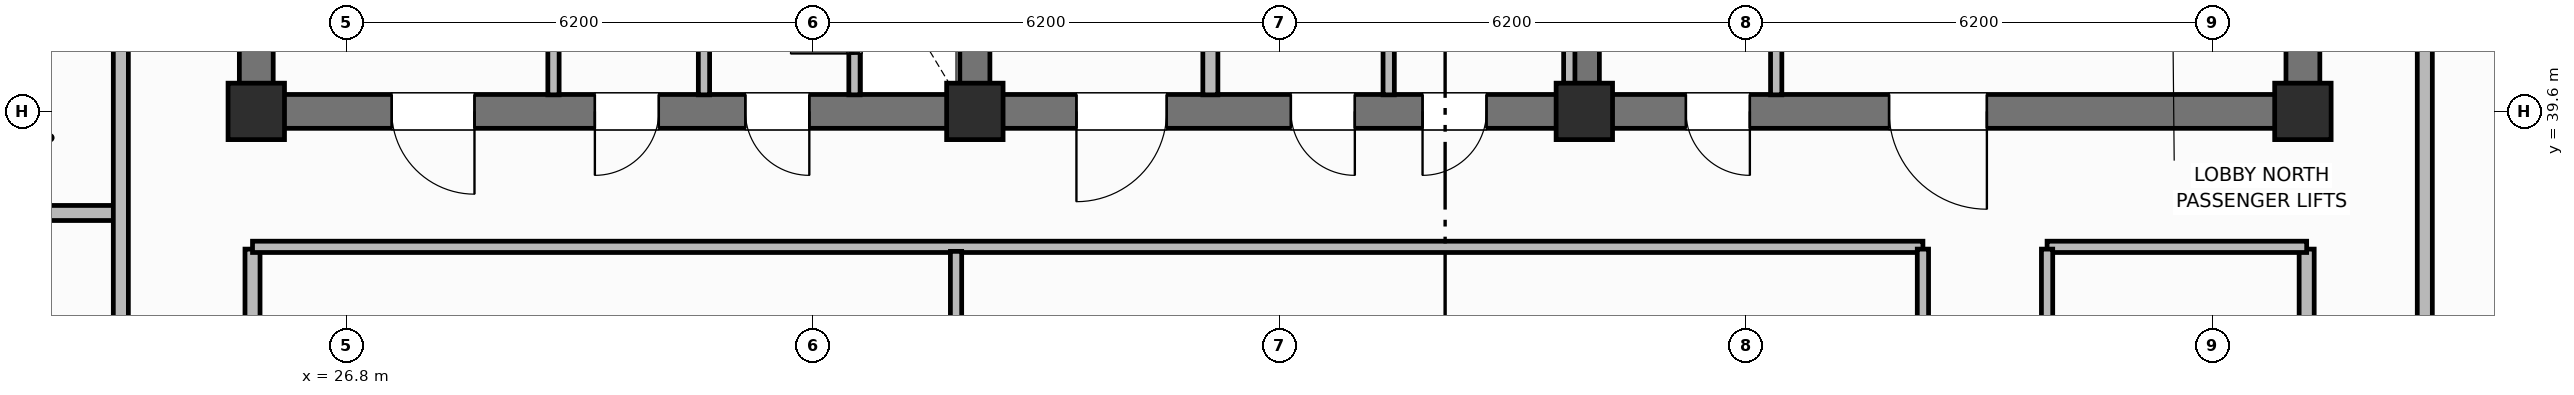
"""IFC4 building model, lengths in metres.
Left out: names, types, materials, properties, quantities, classifications, styles, units other than length and angle.
Written with IfcOpenShell. Run it as: python <this file> out.ifc"""

import sys

from ifc_helpers import new_model, si_unit, direction, frame, frame_2d, origin, origin_2d, place, context, subcontext, project, spatial, rectangle, extrude, element, fill, save


model = new_model("IFC4")
c1 = context("Model", 3, precision=1e-05, world=origin(), true_north=direction((0.0, 1.0)))
c2 = subcontext(c1, "Body", "Model", "MODEL_VIEW")
j1 = project(units=[si_unit("LENGTHUNIT", "METRE"), si_unit("PLANEANGLEUNIT", "RADIAN")], contexts=[c1])
p1 = place(None, origin())
s1 = spatial("IfcSite", under=j1, at=p1, CompositionType="ELEMENT")
p2 = place(p1, origin())
s2 = spatial("IfcBuilding", under=s1, at=p2, CompositionType="ELEMENT")
p3 = place(p2, frame((0.0, 0.0, 267.6)))
s3 = spatial("IfcBuildingStorey", under=s2, at=p3, CompositionType="ELEMENT", Elevation=267.6)
for number, where, z_axis, x_axis in (
    (1, (25.6, 39.825, 0.0), (0.0, 0.0, 1.0), (0.0, 1.0, 0.0)),
    (2, (52.8, 39.825, 0.0), (0.0, 0.0, 1.0), (0.0, 1.0, 0.0)),
):
    element("IfcWall", number, at=place(p3, frame(where, z_axis=z_axis, x_axis=x_axis)), inside=s3, PredefinedType="SHEAR", context=c2, shape_type="SweptSolid", body=[
        extrude(rectangle(XDim=5.75, YDim=0.45, at=frame_2d((2.875, 0.0))), origin(), (0.0, 0.0, 1.0), 3.7),
    ])
p4 = place(p3, frame((52.8, 39.6, 0.0), z_axis=(0.0, 0.0, 1.0), x_axis=(-1.0, 0.0, 0.0)))
e3 = element("IfcWall", 3, at=p4, inside=s3, PredefinedType="SHEAR", context=c2, shape_type="SweptSolid", body=[
    extrude(rectangle(XDim=27.2, YDim=0.45, at=frame_2d((13.6, 0.0))), origin(), (0.0, 0.0, 1.0), 3.7),
])
p5 = place(p4, frame((24.3, 0.0, 0.0)))
e4 = element("IfcOpeningElement", 4, at=p5, cuts=e3, PredefinedType="OPENING", context=c2, shape_type="SweptSolid", body=[
    extrude(rectangle(XDim=1.1, YDim=2.15, at=frame_2d((0.55, 1.075))), frame((0.0, 0.235, 0.0), z_axis=(0.0, -1.0, 0.0), x_axis=(1.0, 0.0, 0.0)), (0.0, 0.0, 1.0), 0.47),
])
p6 = place(p4, frame((21.85, 0.0, 0.0)))
e5 = element("IfcOpeningElement", 5, at=p6, cuts=e3, PredefinedType="OPENING", context=c2, shape_type="SweptSolid", body=[
    extrude(rectangle(XDim=0.85, YDim=2.1, at=frame_2d((0.425, 1.05))), frame((0.0, 0.235, 0.0), z_axis=(0.0, -1.0, 0.0), x_axis=(1.0, 0.0, 0.0)), (0.0, 0.0, 1.0), 0.47),
])
p7 = place(p4, frame((19.85, 0.0, 0.0)))
e6 = element("IfcOpeningElement", 6, at=p7, cuts=e3, PredefinedType="OPENING", context=c2, shape_type="SweptSolid", body=[
    extrude(rectangle(XDim=0.85, YDim=2.1, at=frame_2d((0.425, 1.05))), frame((0.0, 0.235, 0.0), z_axis=(0.0, -1.0, 0.0), x_axis=(1.0, 0.0, 0.0)), (0.0, 0.0, 1.0), 0.47),
])
p8 = place(p4, frame((15.1, 0.0, 0.0)))
e7 = element("IfcOpeningElement", 7, at=p8, cuts=e3, PredefinedType="OPENING", context=c2, shape_type="SweptSolid", body=[
    extrude(rectangle(XDim=1.2, YDim=2.15, at=frame_2d((0.6, 1.075))), frame((0.0, 0.235, 0.0), z_axis=(0.0, -1.0, 0.0), x_axis=(1.0, 0.0, 0.0)), (0.0, 0.0, 1.0), 0.47),
])
p9 = place(p4, frame((12.6, 0.0, 0.0)))
e8 = element("IfcOpeningElement", 8, at=p9, cuts=e3, PredefinedType="OPENING", context=c2, shape_type="SweptSolid", body=[
    extrude(rectangle(XDim=0.85, YDim=2.1, at=frame_2d((0.425, 1.05))), frame((0.0, 0.235, 0.0), z_axis=(0.0, -1.0, 0.0), x_axis=(1.0, 0.0, 0.0)), (0.0, 0.0, 1.0), 0.47),
])
p10 = place(p4, frame((10.85, 0.0, 0.0)))
e9 = element("IfcOpeningElement", 9, at=p10, cuts=e3, PredefinedType="OPENING", context=c2, shape_type="SweptSolid", body=[
    extrude(rectangle(XDim=0.85, YDim=2.1, at=frame_2d((0.425, 1.05))), frame((0.0, 0.235, 0.0), z_axis=(0.0, -1.0, 0.0), x_axis=(1.0, 0.0, 0.0)), (0.0, 0.0, 1.0), 0.47),
])
p11 = place(p4, frame((7.35, 0.0, 0.0)))
e10 = element("IfcOpeningElement", 10, at=p11, cuts=e3, PredefinedType="OPENING", context=c2, shape_type="SweptSolid", body=[
    extrude(rectangle(XDim=0.85, YDim=2.1, at=frame_2d((0.425, 1.05))), frame((0.0, 0.235, 0.0), z_axis=(0.0, -1.0, 0.0), x_axis=(1.0, 0.0, 0.0)), (0.0, 0.0, 1.0), 0.47),
])
p12 = place(p4, frame((4.2, 0.0, 0.0)))
e11 = element("IfcOpeningElement", 11, at=p12, cuts=e3, PredefinedType="OPENING", context=c2, shape_type="SweptSolid", body=[
    extrude(rectangle(XDim=1.3, YDim=2.2, at=frame_2d((0.65, 1.1))), frame((0.0, 0.235, 0.0), z_axis=(0.0, -1.0, 0.0), x_axis=(1.0, 0.0, 0.0)), (0.0, 0.0, 1.0), 0.47),
])
for number, where, z_axis, x_axis in (
    (12, (35.15, 39.825, 0.0), (0.0, 0.0, 1.0), (0.0, 1.0, 0.0)),
    (13, (43.25, 39.825, 0.0), (0.0, 0.0, 1.0), (0.0, 1.0, 0.0)),
):
    element("IfcWall", number, at=place(p3, frame(where, z_axis=z_axis, x_axis=x_axis)), inside=s3, PredefinedType="SHEAR", context=c2, shape_type="SweptSolid", body=[
        extrude(rectangle(XDim=5.75, YDim=0.4, at=frame_2d((2.875, 0.0))), origin(), (0.0, 0.0, 1.0), 3.7),
    ])
for number, where, z_axis, x_axis in (
    (14, (25.6, 39.6, 0.0), (0.0, 0.0, 1.0), (1.0, 0.0, 0.0)),
    (15, (35.15, 39.6, 0.0), (0.0, 0.0, 1.0), (1.0, 0.0, 0.0)),
    (16, (43.25, 39.6, 0.0), (0.0, 0.0, 1.0), (1.0, 0.0, 0.0)),
    (17, (52.8, 39.6, 0.0), (0.0, 0.0, 1.0), (1.0, 0.0, 0.0)),
):
    element("IfcColumn", number, at=place(p3, frame(where, z_axis=z_axis, x_axis=x_axis)), inside=s3, PredefinedType="COLUMN", context=c2, shape_type="SweptSolid", body=[
        extrude(rectangle(XDim=0.75, YDim=0.75, at=origin_2d()), origin(), (0.0, 0.0, 1.0), 3.7),
    ])
p13 = place(p3, frame((33.55, 39.82, 0.0), z_axis=(0.0, 0.0, 1.0), x_axis=(0.0, 1.0, 0.0)))
e18 = element("IfcWall", 18, at=p13, inside=s3, PredefinedType="PARTITIONING", context=c2, shape_type="SweptSolid", body=[
    extrude(rectangle(XDim=2.13, YDim=0.15, at=frame_2d((1.065, 0.0))), origin(), (0.0, 0.0, 1.0), 2.56),
])
p14 = place(p13, frame((0.55, 0.0, 0.0)))
e19 = element("IfcOpeningElement", 19, at=p14, cuts=e18, PredefinedType="OPENING", context=c2, shape_type="SweptSolid", body=[
    extrude(rectangle(XDim=0.85, YDim=2.05, at=frame_2d((0.425, 1.025))), frame((0.0, 0.085, 0.0), z_axis=(0.0, -1.0, 0.0), x_axis=(1.0, 0.0, 0.0)), (0.0, 0.0, 1.0), 0.17),
])
for number, where, z_axis, x_axis in (
    (20, (29.55, 39.82, 0.0), (0.0, 0.0, 1.0), (0.0, 1.0, 0.0)),
    (21, (31.55, 39.82, 0.0), (0.0, 0.0, 1.0), (0.0, 1.0, 0.0)),
):
    element("IfcWall", number, at=place(p3, frame(where, z_axis=z_axis, x_axis=x_axis)), inside=s3, PredefinedType="PARTITIONING", context=c2, shape_type="SweptSolid", body=[
        extrude(rectangle(XDim=2.13, YDim=0.15, at=frame_2d((1.065, 0.0))), origin(), (0.0, 0.0, 1.0), 2.56),
    ])
p15 = place(p3, frame((38.28, 39.82, 0.0), z_axis=(0.0, 0.0, 1.0), x_axis=(0.0, 1.0, 0.0)))
e22 = element("IfcWall", 22, at=p15, inside=s3, PredefinedType="PARTITIONING", context=c2, shape_type="SweptSolid", body=[
    extrude(rectangle(XDim=5.63, YDim=0.2, at=frame_2d((2.815, 0.0))), origin(), (0.0, 0.0, 1.0), 2.56),
])
for number, where, z_axis, x_axis in (
    (23, (43.05, 39.82, 0.0), (0.0, 0.0, 1.0), (0.0, 1.0, 0.0)),
    (24, (40.65, 39.82, 0.0), (0.0, 0.0, 1.0), (0.0, 1.0, 0.0)),
    (25, (45.8, 39.82, 0.0), (0.0, 0.0, 1.0), (0.0, 1.0, 0.0)),
):
    element("IfcWall", number, at=place(p3, frame(where, z_axis=z_axis, x_axis=x_axis)), inside=s3, PredefinedType="PARTITIONING", context=c2, shape_type="SweptSolid", body=[
        extrude(rectangle(XDim=5.63, YDim=0.15, at=frame_2d((2.815, 0.0))), origin(), (0.0, 0.0, 1.0), 2.56),
    ])
for number, where, z_axis, x_axis in (
    (26, (25.55, 18.63, 0.0), (0.0, 0.0, 1.0), (0.0, 1.0, 0.0)),
    (27, (52.85, 18.63, 0.0), (0.0, 0.0, 1.0), (0.0, 1.0, 0.0)),
):
    element("IfcWall", number, at=place(p3, frame(where, z_axis=z_axis, x_axis=x_axis)), inside=s3, PredefinedType="PARTITIONING", context=c2, shape_type="SweptSolid", body=[
        extrude(rectangle(XDim=19.14, YDim=0.2, at=frame_2d((9.57, 0.0))), origin(), (0.0, 0.0, 1.0), 2.56),
    ])
p16 = place(p3, frame((25.55, 37.8, 0.0), z_axis=(0.0, 0.0, 1.0), x_axis=(1.0, 0.0, 0.0)))
e28 = element("IfcWall", 28, at=p16, inside=s3, PredefinedType="PARTITIONING", context=c2, shape_type="SweptSolid", body=[
    extrude(rectangle(XDim=22.2, YDim=0.15, at=frame_2d((11.1, 0.0))), origin(), (0.0, 0.0, 1.0), 2.56),
])
p17 = place(p3, frame((49.4, 37.8, 0.0), z_axis=(0.0, 0.0, 1.0), x_axis=(1.0, 0.0, 0.0)))
e29 = element("IfcWall", 29, at=p17, inside=s3, PredefinedType="PARTITIONING", context=c2, shape_type="SweptSolid", body=[
    extrude(rectangle(XDim=3.45, YDim=0.15, at=frame_2d((1.725, 0.0))), origin(), (0.0, 0.0, 1.0), 2.56),
])
p18 = place(p3, frame((34.9, 18.66, 0.0), z_axis=(0.0, 0.0, 1.0), x_axis=(0.0, 1.0, 0.0)))
e30 = element("IfcWall", 30, at=p18, inside=s3, PredefinedType="PARTITIONING", context=c2, shape_type="SweptSolid", body=[
    extrude(rectangle(XDim=19.08, YDim=0.15, at=frame_2d((9.54, 0.0))), origin(), (0.0, 0.0, 1.0), 2.56),
])
p19 = place(p18, frame((5.0, 0.0, 0.0)))
e31 = element("IfcOpeningElement", 31, at=p19, cuts=e30, PredefinedType="OPENING", context=c2, shape_type="SweptSolid", body=[
    extrude(rectangle(XDim=1.0, YDim=2.15, at=frame_2d((0.5, 1.075))), frame((0.0, 0.085, 0.0), z_axis=(0.0, -1.0, 0.0), x_axis=(1.0, 0.0, 0.0)), (0.0, 0.0, 1.0), 0.17),
])
p20 = place(p3, frame((47.75, 18.63, 0.0), z_axis=(0.0, 0.0, 1.0), x_axis=(0.0, 1.0, 0.0)))
e32 = element("IfcWall", 32, at=p20, inside=s3, PredefinedType="PARTITIONING", context=c2, shape_type="SweptSolid", body=[
    extrude(rectangle(XDim=19.14, YDim=0.15, at=frame_2d((9.57, 0.0))), origin(), (0.0, 0.0, 1.0), 2.56),
])
p21 = place(p20, frame((2.4, 0.0, 0.0)))
e33 = element("IfcOpeningElement", 33, at=p21, cuts=e32, PredefinedType="OPENING", context=c2, shape_type="SweptSolid", body=[
    extrude(rectangle(XDim=0.9, YDim=2.1, at=frame_2d((0.45, 1.05))), frame((0.0, 0.085, 0.0), z_axis=(0.0, -1.0, 0.0), x_axis=(1.0, 0.0, 0.0)), (0.0, 0.0, 1.0), 0.17),
])
p22 = place(p20, frame((10.804, 0.0, 0.0)))
e34 = element("IfcOpeningElement", 34, at=p22, cuts=e32, PredefinedType="OPENING", context=c2, shape_type="SweptSolid", body=[
    extrude(rectangle(XDim=0.9, YDim=2.1, at=frame_2d((0.45, 1.05))), frame((0.0, 0.085, 0.0), z_axis=(0.0, -1.0, 0.0), x_axis=(1.0, 0.0, 0.0)), (0.0, 0.0, 1.0), 0.17),
])
p23 = place(p3, frame((49.4, 18.63, 0.0), z_axis=(0.0, 0.0, 1.0), x_axis=(0.0, 1.0, 0.0)))
e35 = element("IfcWall", 35, at=p23, inside=s3, PredefinedType="PARTITIONING", context=c2, shape_type="SweptSolid", body=[
    extrude(rectangle(XDim=19.14, YDim=0.15, at=frame_2d((9.57, 0.0))), origin(), (0.0, 0.0, 1.0), 2.56),
])
p24 = place(p23, frame((2.4, 0.0, 0.0)))
e36 = element("IfcOpeningElement", 36, at=p24, cuts=e35, PredefinedType="OPENING", context=c2, shape_type="SweptSolid", body=[
    extrude(rectangle(XDim=1.0, YDim=2.15, at=frame_2d((0.5, 1.075))), frame((0.0, 0.085, 0.0), z_axis=(0.0, -1.0, 0.0), x_axis=(1.0, 0.0, 0.0)), (0.0, 0.0, 1.0), 0.17),
])
p25 = place(p23, frame((10.804, 0.0, 0.0)))
e37 = element("IfcOpeningElement", 37, at=p25, cuts=e35, PredefinedType="OPENING", context=c2, shape_type="SweptSolid", body=[
    extrude(rectangle(XDim=1.0, YDim=2.15, at=frame_2d((0.5, 1.075))), frame((0.0, 0.085, 0.0), z_axis=(0.0, -1.0, 0.0), x_axis=(1.0, 0.0, 0.0)), (0.0, 0.0, 1.0), 0.17),
])
p26 = place(p3, frame((19.53, 38.25, 0.0), z_axis=(0.0, 0.0, 1.0), x_axis=(1.0, 0.0, 0.0)))
e38 = element("IfcWall", 38, at=p26, inside=s3, PredefinedType="PARTITIONING", context=c2, shape_type="SweptSolid", body=[
    extrude(rectangle(XDim=4.27, YDim=0.2, at=frame_2d((2.135, 0.0))), origin(), (0.0, 0.0, 1.0), 2.56),
])
p27 = place(p3, frame((23.8, 9.95, 0.0), z_axis=(0.0, 0.0, 1.0), x_axis=(0.0, 1.0, 0.0)))
e39 = element("IfcWall", 39, at=p27, inside=s3, PredefinedType="PARTITIONING", context=c2, shape_type="SweptSolid", body=[
    extrude(rectangle(XDim=36.5, YDim=0.2, at=frame_2d((18.25, 0.0))), origin(), (0.0, 0.0, 1.0), 2.56),
])
p28 = place(p27, frame((3.11, 0.0, 0.0)))
e40 = element("IfcOpeningElement", 40, at=p28, cuts=e39, PredefinedType="OPENING", context=c2, shape_type="SweptSolid", body=[
    extrude(rectangle(XDim=1.0, YDim=2.15, at=frame_2d((0.5, 1.075))), frame((0.0, 0.11, 0.0), z_axis=(0.0, -1.0, 0.0), x_axis=(1.0, 0.0, 0.0)), (0.0, 0.0, 1.0), 0.22),
])
p29 = place(p27, frame((11.99, 0.0, 0.0)))
e41 = element("IfcOpeningElement", 41, at=p29, cuts=e39, PredefinedType="OPENING", context=c2, shape_type="SweptSolid", body=[
    extrude(rectangle(XDim=1.0, YDim=2.15, at=frame_2d((0.5, 1.075))), frame((0.0, 0.11, 0.0), z_axis=(0.0, -1.0, 0.0), x_axis=(1.0, 0.0, 0.0)), (0.0, 0.0, 1.0), 0.22),
])
p30 = place(p27, frame((23.5, 0.0, 0.0)))
e42 = element("IfcOpeningElement", 42, at=p30, cuts=e39, PredefinedType="OPENING", context=c2, shape_type="SweptSolid", body=[
    extrude(rectangle(XDim=1.0, YDim=2.15, at=frame_2d((0.5, 1.075))), frame((0.0, 0.11, 0.0), z_axis=(0.0, -1.0, 0.0), x_axis=(1.0, 0.0, 0.0)), (0.0, 0.0, 1.0), 0.22),
])
p31 = place(p27, frame((31.2, 0.0, 0.0)))
e43 = element("IfcOpeningElement", 43, at=p31, cuts=e39, PredefinedType="OPENING", context=c2, shape_type="SweptSolid", body=[
    extrude(rectangle(XDim=1.0, YDim=2.15, at=frame_2d((0.5, 1.075))), frame((0.0, 0.11, 0.0), z_axis=(0.0, -1.0, 0.0), x_axis=(1.0, 0.0, 0.0)), (0.0, 0.0, 1.0), 0.22),
])
p32 = place(p3, frame((54.42, 9.95, 0.0), z_axis=(0.0, 0.0, 1.0), x_axis=(0.0, 1.0, 0.0)))
e44 = element("IfcWall", 44, at=p32, inside=s3, PredefinedType="PARTITIONING", context=c2, shape_type="SweptSolid", body=[
    extrude(rectangle(XDim=36.5, YDim=0.2, at=frame_2d((18.25, 0.0))), origin(), (0.0, 0.0, 1.0), 2.56),
])
p33 = place(p32, frame((3.25, 0.0, 0.0)))
e45 = element("IfcOpeningElement", 45, at=p33, cuts=e44, PredefinedType="OPENING", context=c2, shape_type="SweptSolid", body=[
    extrude(rectangle(XDim=1.0, YDim=2.15, at=frame_2d((0.5, 1.075))), frame((0.0, 0.11, 0.0), z_axis=(0.0, -1.0, 0.0), x_axis=(1.0, 0.0, 0.0)), (0.0, 0.0, 1.0), 0.22),
])
p34 = place(p32, frame((14.25, 0.0, 0.0)))
e46 = element("IfcOpeningElement", 46, at=p34, cuts=e44, PredefinedType="OPENING", context=c2, shape_type="SweptSolid", body=[
    extrude(rectangle(XDim=1.0, YDim=2.15, at=frame_2d((0.5, 1.075))), frame((0.0, 0.11, 0.0), z_axis=(0.0, -1.0, 0.0), x_axis=(1.0, 0.0, 0.0)), (0.0, 0.0, 1.0), 0.22),
])
p35 = place(p14, origin())
e47 = element("IfcDoor", 47, at=p35, inside=s3, OperationType="SINGLE_SWING_LEFT", PredefinedType="TRAPDOOR", context=c2, shape_type="SweptSolid", body=[
    extrude(rectangle(XDim=0.85, YDim=2.05, at=frame_2d((0.425, 1.025))), frame((0.0, 0.025, 0.0), z_axis=(0.0, -1.0, 0.0), x_axis=(1.0, 0.0, 0.0)), (0.0, 0.0, 1.0), 0.05),
])
fill(e19, e47)
p36 = place(p5, origin())
e48 = element("IfcDoor", 48, at=p36, inside=s3, OperationType="SINGLE_SWING_LEFT", PredefinedType="DOOR", context=c2, shape_type="SweptSolid", body=[
    extrude(rectangle(XDim=1.1, YDim=2.15, at=frame_2d((0.55, 1.075))), frame((0.0, 0.025, 0.0), z_axis=(0.0, -1.0, 0.0), x_axis=(1.0, 0.0, 0.0)), (0.0, 0.0, 1.0), 0.05),
])
fill(e4, e48)
p37 = place(p6, origin())
e49 = element("IfcDoor", 49, at=p37, inside=s3, OperationType="SINGLE_SWING_RIGHT", PredefinedType="DOOR", context=c2, shape_type="SweptSolid", body=[
    extrude(rectangle(XDim=0.85, YDim=2.1, at=frame_2d((0.425, 1.05))), frame((0.0, 0.025, 0.0), z_axis=(0.0, -1.0, 0.0), x_axis=(1.0, 0.0, 0.0)), (0.0, 0.0, 1.0), 0.05),
])
fill(e5, e49)
p38 = place(p7, origin())
e50 = element("IfcDoor", 50, at=p38, inside=s3, OperationType="SINGLE_SWING_LEFT", PredefinedType="DOOR", context=c2, shape_type="SweptSolid", body=[
    extrude(rectangle(XDim=0.85, YDim=2.1, at=frame_2d((0.425, 1.05))), frame((0.0, 0.025, 0.0), z_axis=(0.0, -1.0, 0.0), x_axis=(1.0, 0.0, 0.0)), (0.0, 0.0, 1.0), 0.05),
])
fill(e6, e50)
p39 = place(p8, origin())
e51 = element("IfcDoor", 51, at=p39, inside=s3, OperationType="SINGLE_SWING_RIGHT", PredefinedType="DOOR", context=c2, shape_type="SweptSolid", body=[
    extrude(rectangle(XDim=1.2, YDim=2.15, at=frame_2d((0.6, 1.075))), frame((0.0, 0.025, 0.0), z_axis=(0.0, -1.0, 0.0), x_axis=(1.0, 0.0, 0.0)), (0.0, 0.0, 1.0), 0.05),
])
fill(e7, e51)
p40 = place(p9, origin())
e52 = element("IfcDoor", 52, at=p40, inside=s3, OperationType="SINGLE_SWING_LEFT", PredefinedType="DOOR", context=c2, shape_type="SweptSolid", body=[
    extrude(rectangle(XDim=0.85, YDim=2.1, at=frame_2d((0.425, 1.05))), frame((0.0, 0.025, 0.0), z_axis=(0.0, -1.0, 0.0), x_axis=(1.0, 0.0, 0.0)), (0.0, 0.0, 1.0), 0.05),
])
fill(e8, e52)
p41 = place(p10, origin())
e53 = element("IfcDoor", 53, at=p41, inside=s3, OperationType="SINGLE_SWING_RIGHT", PredefinedType="DOOR", context=c2, shape_type="SweptSolid", body=[
    extrude(rectangle(XDim=0.85, YDim=2.1, at=frame_2d((0.425, 1.05))), frame((0.0, 0.025, 0.0), z_axis=(0.0, -1.0, 0.0), x_axis=(1.0, 0.0, 0.0)), (0.0, 0.0, 1.0), 0.05),
])
fill(e9, e53)
p42 = place(p11, origin())
e54 = element("IfcDoor", 54, at=p42, inside=s3, OperationType="SINGLE_SWING_LEFT", PredefinedType="DOOR", context=c2, shape_type="SweptSolid", body=[
    extrude(rectangle(XDim=0.85, YDim=2.1, at=frame_2d((0.425, 1.05))), frame((0.0, 0.025, 0.0), z_axis=(0.0, -1.0, 0.0), x_axis=(1.0, 0.0, 0.0)), (0.0, 0.0, 1.0), 0.05),
])
fill(e10, e54)
p43 = place(p12, origin())
e55 = element("IfcDoor", 55, at=p43, inside=s3, OperationType="SINGLE_SWING_LEFT", PredefinedType="DOOR", context=c2, shape_type="SweptSolid", body=[
    extrude(rectangle(XDim=1.3, YDim=2.2, at=frame_2d((0.65, 1.1))), frame((0.0, 0.025, 0.0), z_axis=(0.0, -1.0, 0.0), x_axis=(1.0, 0.0, 0.0)), (0.0, 0.0, 1.0), 0.05),
])
fill(e11, e55)
save(model, sys.argv[1])
